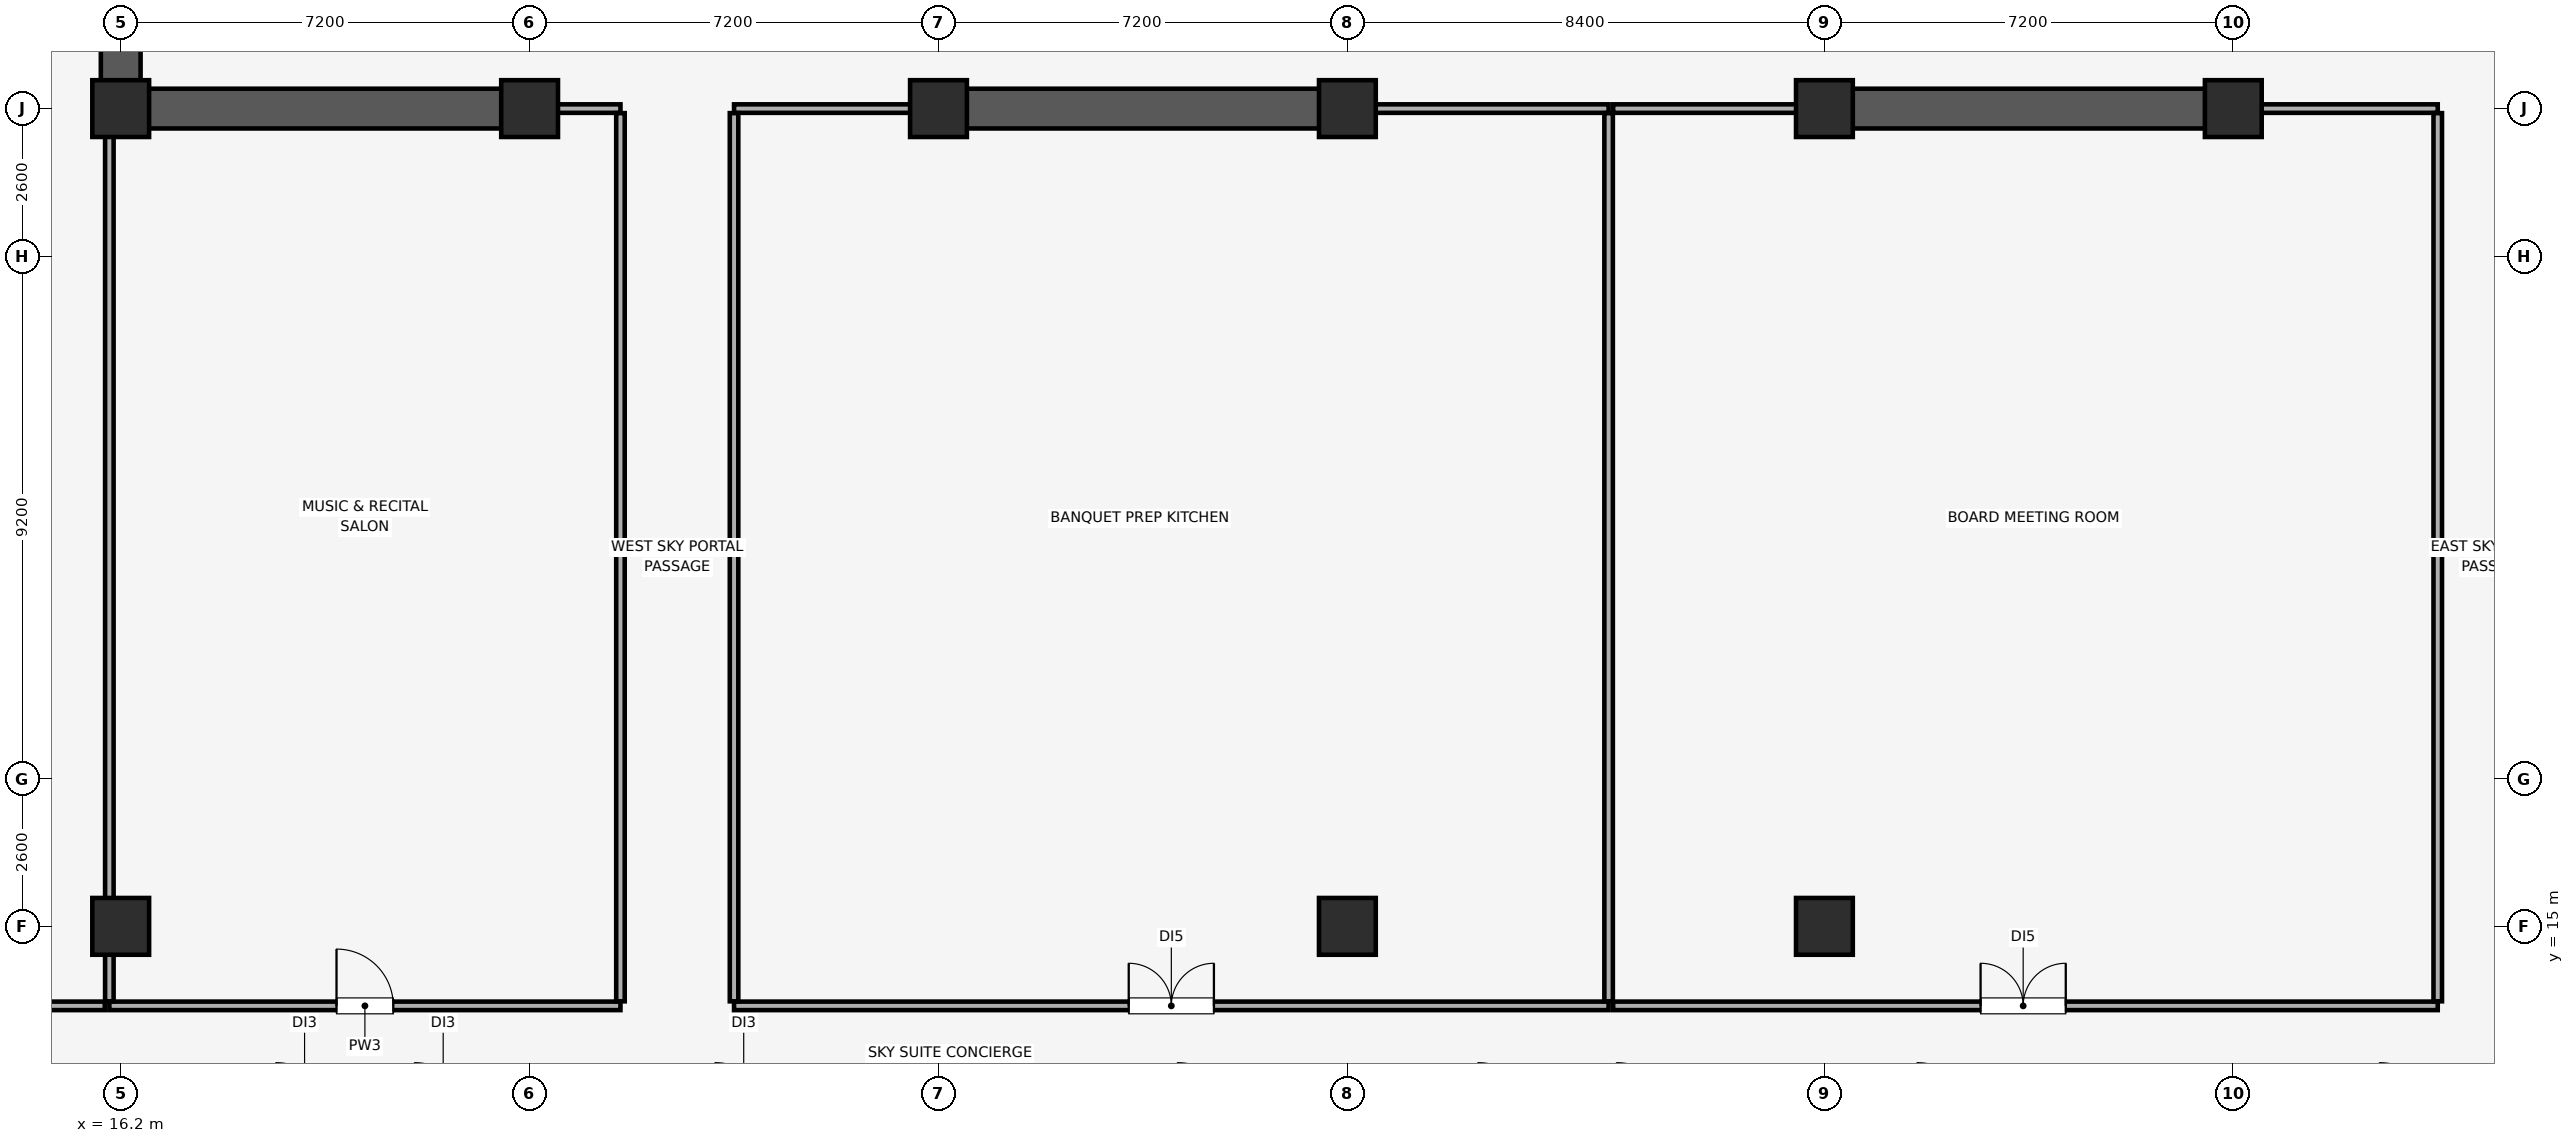
"""IFC4 building model, lengths in metres.
Left out: names, types, materials, properties, quantities, classifications, styles, units other than length and angle.
Written with IfcOpenShell. Run it as: python <this file> out.ifc"""

import sys

from ifc_helpers import new_model, si_unit, direction, frame, frame_2d, origin, origin_2d, place, context, subcontext, project, spatial, rectangle, extrude, element, fill, save


model = new_model("IFC4")
c1 = context("Model", 3, precision=1e-05, world=origin(), true_north=direction((0.0, 1.0)))
c2 = subcontext(c1, "Body", "Model", "MODEL_VIEW")
j1 = project(units=[si_unit("LENGTHUNIT", "METRE"), si_unit("PLANEANGLEUNIT", "RADIAN")], contexts=[c1])
p1 = place(None, origin())
s1 = spatial("IfcSite", under=j1, at=p1, CompositionType="ELEMENT")
p2 = place(p1, origin())
s2 = spatial("IfcBuilding", under=s1, at=p2, CompositionType="ELEMENT")
p3 = place(p2, frame((0.0, 0.0, 229.15)))
s3 = spatial("IfcBuildingStorey", under=s2, at=p3, CompositionType="ELEMENT", Elevation=229.15)
for number, where, z_axis, x_axis in (
    (1, (16.2, 15.0, 0.0), (0.0, 0.0, 1.0), (1.0, 0.0, 0.0)),
    (2, (37.8, 15.0, 0.0), (0.0, 0.0, 1.0), (1.0, 0.0, 0.0)),
    (3, (46.2, 15.0, 0.0), (0.0, 0.0, 1.0), (1.0, 0.0, 0.0)),
    (4, (16.2, 29.4, 0.0), (0.0, 0.0, 1.0), (1.0, 0.0, 0.0)),
    (5, (23.4, 29.4, 0.0), (0.0, 0.0, 1.0), (1.0, 0.0, 0.0)),
    (6, (30.6, 29.4, 0.0), (0.0, 0.0, 1.0), (1.0, 0.0, 0.0)),
    (7, (37.8, 29.4, 0.0), (0.0, 0.0, 1.0), (1.0, 0.0, 0.0)),
    (8, (46.2, 29.4, 0.0), (0.0, 0.0, 1.0), (1.0, 0.0, 0.0)),
    (9, (53.4, 29.4, 0.0), (0.0, 0.0, 1.0), (1.0, 0.0, 0.0)),
):
    element("IfcColumn", number, at=place(p3, frame(where, z_axis=z_axis, x_axis=x_axis)), inside=s3, PredefinedType="COLUMN", context=c2, shape_type="SweptSolid", body=[
        extrude(rectangle(XDim=1.0, YDim=1.0, at=origin_2d()), origin(), (0.0, 0.0, 1.0), 3.71),
    ])
p4 = place(p3, frame((16.2, 29.4, 0.0), z_axis=(0.0, 0.0, 1.0), x_axis=(0.0, 1.0, 0.0)))
e10 = element("IfcWall", 10, at=p4, inside=s3, PredefinedType="SHEAR", context=c2, shape_type="SweptSolid", body=[
    extrude(rectangle(XDim=19.2, YDim=0.7, at=frame_2d((9.6, 0.0))), origin(), (0.0, 0.0, 1.0), 3.71),
])
p5 = place(p3, frame((16.555, 29.4, 0.0), z_axis=(0.0, 0.0, 1.0), x_axis=(1.0, 0.0, 0.0)))
e11 = element("IfcWall", 11, at=p5, inside=s3, PredefinedType="SHEAR", context=c2, shape_type="SweptSolid", body=[
    extrude(rectangle(XDim=7.045, YDim=0.7, at=frame_2d((3.522, 0.0))), origin(), (0.0, 0.0, 1.0), 3.71),
])
for number, where, z_axis, x_axis in (
    (12, (30.4, 29.4, 0.0), (0.0, 0.0, 1.0), (1.0, 0.0, 0.0)),
    (13, (46.0, 29.4, 0.0), (0.0, 0.0, 1.0), (1.0, 0.0, 0.0)),
):
    element("IfcWall", number, at=place(p3, frame(where, z_axis=z_axis, x_axis=x_axis)), inside=s3, PredefinedType="SHEAR", context=c2, shape_type="SweptSolid", body=[
        extrude(rectangle(XDim=7.6, YDim=0.7, at=frame_2d((3.8, 0.0))), origin(), (0.0, 0.0, 1.0), 3.71),
    ])
p6 = place(p3, frame((16.0, 13.6, 0.0), z_axis=(0.0, 0.0, 1.0), x_axis=(1.0, 0.0, 0.0)))
e14 = element("IfcWall", 14, at=p6, inside=s3, PredefinedType="PARTITIONING", context=c2, shape_type="SweptSolid", body=[
    extrude(rectangle(XDim=9.0, YDim=0.15, at=frame_2d((4.5, 0.0))), origin(), (0.0, 0.0, 1.0), 3.71),
])
p7 = place(p6, frame((4.0, 0.0, 0.0)))
e15 = element("IfcOpeningElement", 15, at=p7, cuts=e14, PredefinedType="OPENING", context=c2, shape_type="SweptSolid", body=[
    extrude(rectangle(XDim=1.0, YDim=2.15, at=frame_2d((0.5, 1.075))), frame((0.0, 0.085, 0.0), z_axis=(0.0, -1.0, 0.0), x_axis=(1.0, 0.0, 0.0)), (0.0, 0.0, 1.0), 0.17),
])
p8 = place(p3, frame((23.61, 29.4, 0.0), z_axis=(0.0, 0.0, 1.0), x_axis=(1.0, 0.0, 0.0)))
e16 = element("IfcWall", 16, at=p8, inside=s3, PredefinedType="PARTITIONING", context=c2, shape_type="SweptSolid", body=[
    extrude(rectangle(XDim=1.39, YDim=0.15, at=frame_2d((0.695, 0.0))), origin(), (0.0, 0.0, 1.0), 2.61),
])
p9 = place(p3, frame((16.0, 13.68, 0.0), z_axis=(0.0, 0.0, 1.0), x_axis=(0.0, 1.0, 0.0)))
e17 = element("IfcWall", 17, at=p9, inside=s3, PredefinedType="PARTITIONING", context=c2, shape_type="SweptSolid", body=[
    extrude(rectangle(XDim=15.71, YDim=0.15, at=frame_2d((7.855, 0.0))), origin(), (0.0, 0.0, 1.0), 3.26),
])
p10 = place(p3, frame((25.0, 13.68, 0.0), z_axis=(0.0, 0.0, 1.0), x_axis=(0.0, 1.0, 0.0)))
e18 = element("IfcWall", 18, at=p10, inside=s3, PredefinedType="PARTITIONING", context=c2, shape_type="SweptSolid", body=[
    extrude(rectangle(XDim=15.64, YDim=0.15, at=frame_2d((7.82, 0.0))), origin(), (0.0, 0.0, 1.0), 3.71),
])
p11 = place(p3, frame((27.0, 13.6, 0.0), z_axis=(0.0, 0.0, 1.0), x_axis=(1.0, 0.0, 0.0)))
e19 = element("IfcWall", 19, at=p11, inside=s3, PredefinedType="PARTITIONING", context=c2, shape_type="SweptSolid", body=[
    extrude(rectangle(XDim=15.4, YDim=0.15, at=frame_2d((7.7, 0.0))), origin(), (0.0, 0.0, 1.0), 3.71),
])
p12 = place(p11, frame((6.95, 0.0, 0.0)))
e20 = element("IfcOpeningElement", 20, at=p12, cuts=e19, PredefinedType="OPENING", context=c2, shape_type="SweptSolid", body=[
    extrude(rectangle(XDim=1.5, YDim=2.25, at=frame_2d((0.75, 1.125))), frame((0.0, 0.085, 0.0), z_axis=(0.0, -1.0, 0.0), x_axis=(1.0, 0.0, 0.0)), (0.0, 0.0, 1.0), 0.17),
])
p13 = place(p3, frame((27.0, 29.4, 0.0), z_axis=(0.0, 0.0, 1.0), x_axis=(1.0, 0.0, 0.0)))
e21 = element("IfcWall", 21, at=p13, inside=s3, PredefinedType="PARTITIONING", context=c2, shape_type="SweptSolid", body=[
    extrude(rectangle(XDim=3.39, YDim=0.15, at=frame_2d((1.695, 0.0))), origin(), (0.0, 0.0, 1.0), 2.61),
])
p14 = place(p3, frame((38.01, 29.4, 0.0), z_axis=(0.0, 0.0, 1.0), x_axis=(1.0, 0.0, 0.0)))
e22 = element("IfcWall", 22, at=p14, inside=s3, PredefinedType="PARTITIONING", context=c2, shape_type="SweptSolid", body=[
    extrude(rectangle(XDim=4.39, YDim=0.15, at=frame_2d((2.195, 0.0))), origin(), (0.0, 0.0, 1.0), 2.61),
])
p15 = place(p3, frame((27.0, 13.68, 0.0), z_axis=(0.0, 0.0, 1.0), x_axis=(0.0, 1.0, 0.0)))
e23 = element("IfcWall", 23, at=p15, inside=s3, PredefinedType="PARTITIONING", context=c2, shape_type="SweptSolid", body=[
    extrude(rectangle(XDim=15.64, YDim=0.15, at=frame_2d((7.82, 0.0))), origin(), (0.0, 0.0, 1.0), 3.26),
])
p16 = place(p3, frame((42.4, 13.68, 0.0), z_axis=(0.0, 0.0, 1.0), x_axis=(0.0, 1.0, 0.0)))
e24 = element("IfcWall", 24, at=p16, inside=s3, PredefinedType="PARTITIONING", context=c2, shape_type="SweptSolid", body=[
    extrude(rectangle(XDim=15.64, YDim=0.15, at=frame_2d((7.82, 0.0))), origin(), (0.0, 0.0, 1.0), 3.71),
])
p17 = place(p3, frame((42.48, 13.6, 0.0), z_axis=(0.0, 0.0, 1.0), x_axis=(1.0, 0.0, 0.0)))
e25 = element("IfcWall", 25, at=p17, inside=s3, PredefinedType="PARTITIONING", context=c2, shape_type="SweptSolid", body=[
    extrude(rectangle(XDim=14.52, YDim=0.15, at=frame_2d((7.26, 0.0))), origin(), (0.0, 0.0, 1.0), 3.71),
])
p18 = place(p17, frame((6.47, 0.0, 0.0)))
e26 = element("IfcOpeningElement", 26, at=p18, cuts=e25, PredefinedType="OPENING", context=c2, shape_type="SweptSolid", body=[
    extrude(rectangle(XDim=1.5, YDim=2.25, at=frame_2d((0.75, 1.125))), frame((0.0, 0.085, 0.0), z_axis=(0.0, -1.0, 0.0), x_axis=(1.0, 0.0, 0.0)), (0.0, 0.0, 1.0), 0.17),
])
p19 = place(p3, frame((42.48, 29.4, 0.0), z_axis=(0.0, 0.0, 1.0), x_axis=(1.0, 0.0, 0.0)))
e27 = element("IfcWall", 27, at=p19, inside=s3, PredefinedType="PARTITIONING", context=c2, shape_type="SweptSolid", body=[
    extrude(rectangle(XDim=3.51, YDim=0.15, at=frame_2d((1.755, 0.0))), origin(), (0.0, 0.0, 1.0), 2.61),
])
p20 = place(p3, frame((53.61, 29.4, 0.0), z_axis=(0.0, 0.0, 1.0), x_axis=(1.0, 0.0, 0.0)))
e28 = element("IfcWall", 28, at=p20, inside=s3, PredefinedType="PARTITIONING", context=c2, shape_type="SweptSolid", body=[
    extrude(rectangle(XDim=3.39, YDim=0.15, at=frame_2d((1.695, 0.0))), origin(), (0.0, 0.0, 1.0), 2.61),
])
p21 = place(p3, frame((57.0, 13.68, 0.0), z_axis=(0.0, 0.0, 1.0), x_axis=(0.0, 1.0, 0.0)))
e29 = element("IfcWall", 29, at=p21, inside=s3, PredefinedType="PARTITIONING", context=c2, shape_type="SweptSolid", body=[
    extrude(rectangle(XDim=15.64, YDim=0.15, at=frame_2d((7.82, 0.0))), origin(), (0.0, 0.0, 1.0), 3.26),
])
p22 = place(p3, frame((6.15, 13.6, 0.0), z_axis=(0.0, 0.0, 1.0), x_axis=(1.0, 0.0, 0.0)))
e30 = element("IfcWall", 30, at=p22, inside=s3, PredefinedType="PARTITIONING", context=c2, shape_type="SweptSolid", body=[
    extrude(rectangle(XDim=9.77, YDim=0.15, at=frame_2d((4.885, 0.0))), origin(), (0.0, 0.0, 1.0), 3.71),
])
p23 = place(p22, frame((6.13, 0.0, 0.0)))
e31 = element("IfcOpeningElement", 31, at=p23, cuts=e30, PredefinedType="OPENING", context=c2, shape_type="SweptSolid", body=[
    extrude(rectangle(XDim=1.5, YDim=2.25, at=frame_2d((0.75, 1.125))), frame((0.0, 0.085, 0.0), z_axis=(0.0, -1.0, 0.0), x_axis=(1.0, 0.0, 0.0)), (0.0, 0.0, 1.0), 0.17),
])
p24 = place(p7, origin())
e32 = element("IfcDoor", 32, at=p24, inside=s3, OperationType="SINGLE_SWING_LEFT", PredefinedType="DOOR", context=c2, shape_type="SweptSolid", body=[
    extrude(rectangle(XDim=1.0, YDim=2.15, at=frame_2d((0.5, 1.075))), frame((0.0, 0.025, 0.0), z_axis=(0.0, -1.0, 0.0), x_axis=(1.0, 0.0, 0.0)), (0.0, 0.0, 1.0), 0.05),
])
fill(e15, e32)
p25 = place(p12, origin())
e33 = element("IfcDoor", 33, at=p25, inside=s3, OperationType="DOUBLE_DOOR_SINGLE_SWING", PredefinedType="DOOR", context=c2, shape_type="SweptSolid", body=[
    extrude(rectangle(XDim=1.5, YDim=2.25, at=frame_2d((0.75, 1.125))), frame((0.0, 0.025, 0.0), z_axis=(0.0, -1.0, 0.0), x_axis=(1.0, 0.0, 0.0)), (0.0, 0.0, 1.0), 0.05),
])
fill(e20, e33)
p26 = place(p18, origin())
e34 = element("IfcDoor", 34, at=p26, inside=s3, OperationType="DOUBLE_DOOR_SINGLE_SWING", PredefinedType="DOOR", context=c2, shape_type="SweptSolid", body=[
    extrude(rectangle(XDim=1.5, YDim=2.25, at=frame_2d((0.75, 1.125))), frame((0.0, 0.025, 0.0), z_axis=(0.0, -1.0, 0.0), x_axis=(1.0, 0.0, 0.0)), (0.0, 0.0, 1.0), 0.05),
])
fill(e26, e34)
save(model, sys.argv[1])
